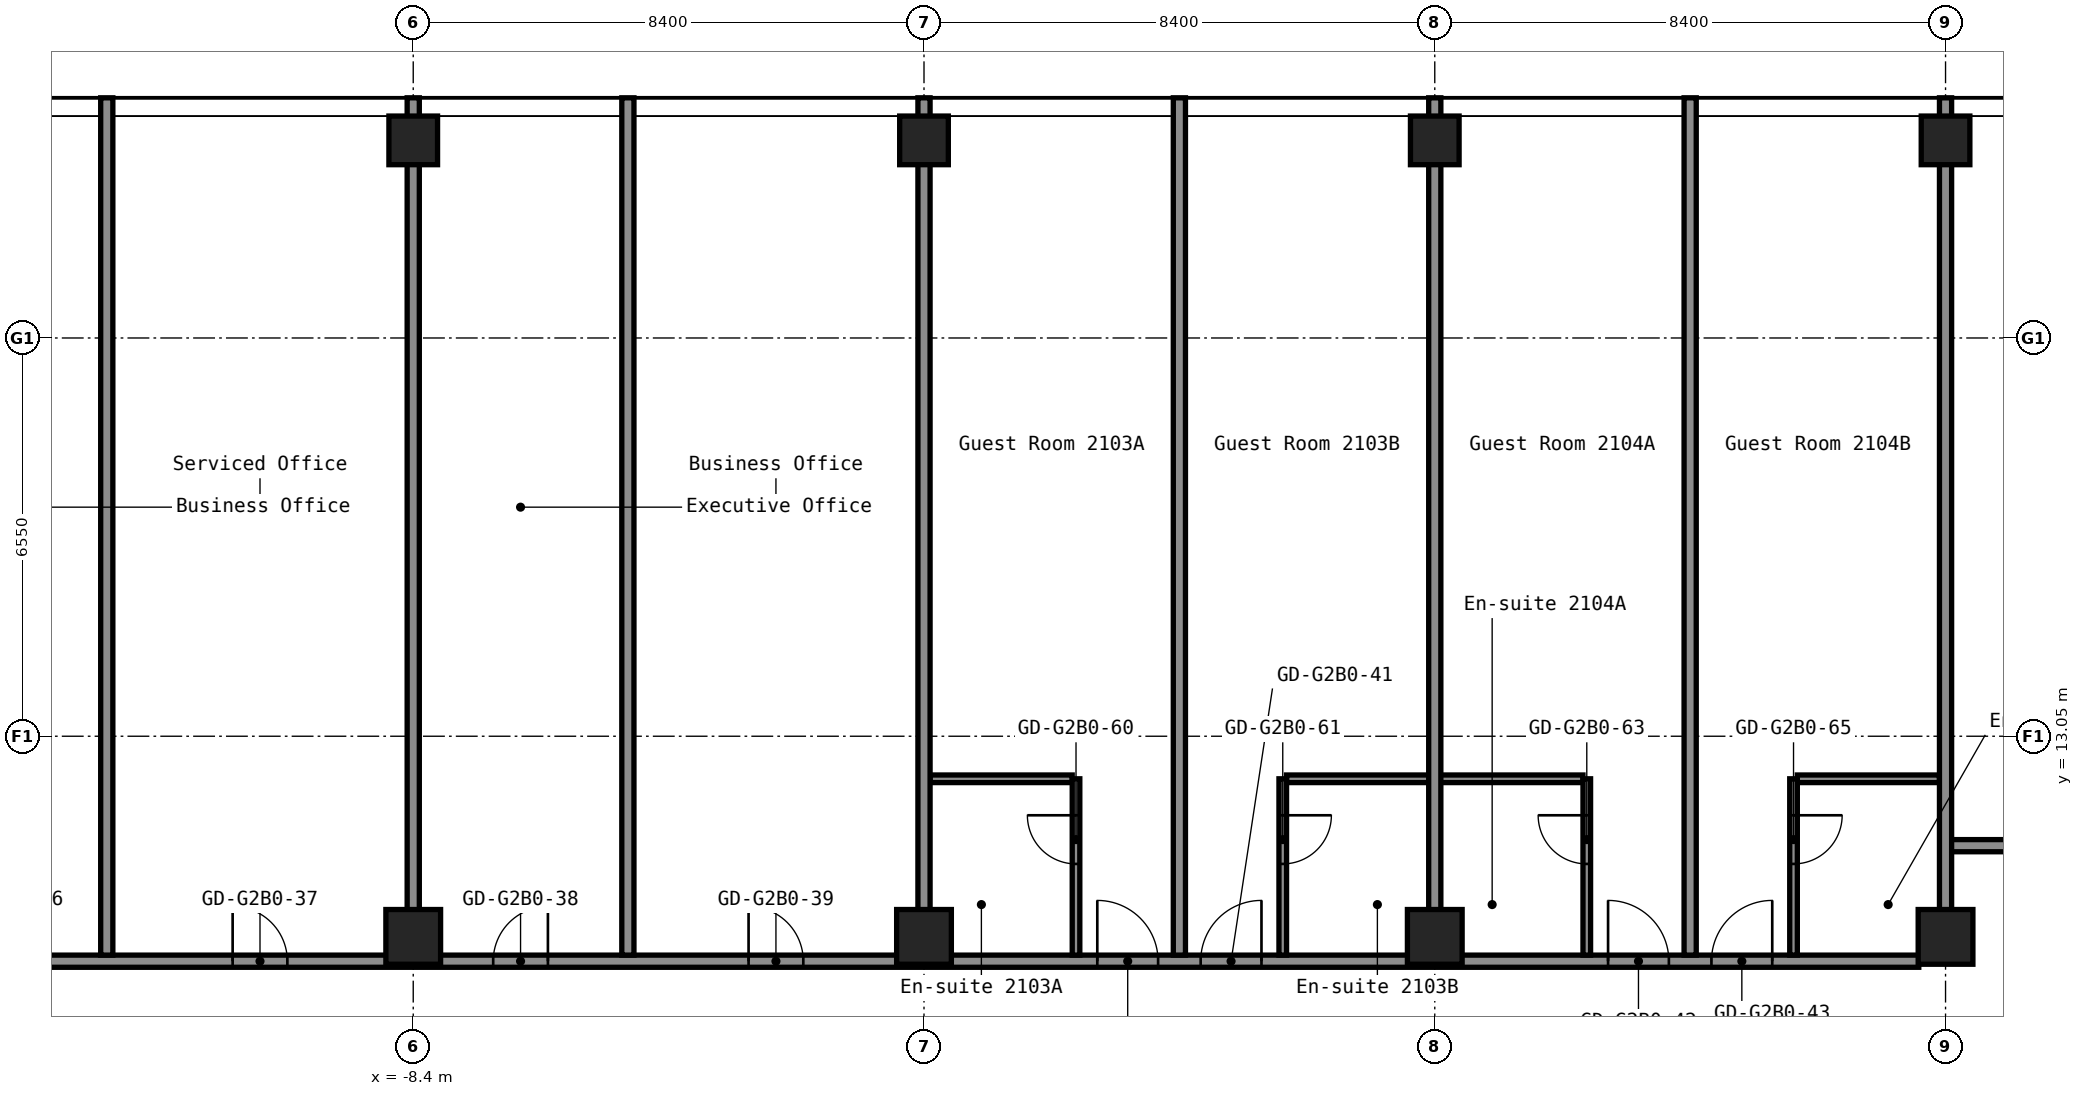
"""IFC4 building model, lengths in metres.
Left out: names, types, materials, properties, quantities, classifications, styles, units other than length and angle.
Written with IfcOpenShell. Run it as: python <this file> out.ifc"""

import sys

from ifc_helpers import new_model, si_unit, direction, frame, frame_2d, origin, origin_2d, place, context, subcontext, project, spatial, rectangle, hollow_rectangle, extrude, element, fill, save


model = new_model("IFC4")
c1 = context("Model", 3, precision=1e-05, world=origin(), true_north=direction((0.0, 1.0)))
c2 = subcontext(c1, "Body", "Model", "MODEL_VIEW")
j1 = project(units=[si_unit("LENGTHUNIT", "METRE"), si_unit("PLANEANGLEUNIT", "RADIAN")], contexts=[c1])
p1 = place(None, origin())
s1 = spatial("IfcSite", under=j1, at=p1, CompositionType="ELEMENT")
p2 = place(p1, origin())
s2 = spatial("IfcBuilding", under=s1, at=p2, CompositionType="ELEMENT")
p3 = place(p2, frame((0.0, 0.0, 78.6)))
s3 = spatial("IfcBuildingStorey", under=s2, at=p3, CompositionType="ELEMENT", Elevation=78.6)
p4 = place(p3, frame((-8.4, 9.75, 0.0), z_axis=(0.0, 0.0, 1.0), x_axis=(1.0, 0.0, 0.0)))
e1 = element("IfcColumn", 1, at=p4, inside=s3, PredefinedType="COLUMN", context=c2, shape_type="SweptSolid", body=[
    extrude(hollow_rectangle(XDim=0.9, YDim=0.9, WallThickness=0.036, at=origin_2d()), origin(), (0.0, 0.0, 1.0), 2.8),
])
p5 = place(p3, frame((-8.4, 22.85, 0.0), z_axis=(0.0, 0.0, 1.0), x_axis=(1.0, 0.0, 0.0)))
e2 = element("IfcColumn", 2, at=p5, inside=s3, PredefinedType="COLUMN", context=c2, shape_type="SweptSolid", body=[
    extrude(hollow_rectangle(XDim=0.8, YDim=0.8, WallThickness=0.032, at=origin_2d()), origin(), (0.0, 0.0, 1.0), 2.8),
])
p6 = place(p3, frame((0.0, 9.75, 0.0), z_axis=(0.0, 0.0, 1.0), x_axis=(1.0, 0.0, 0.0)))
e3 = element("IfcColumn", 3, at=p6, inside=s3, PredefinedType="COLUMN", context=c2, shape_type="SweptSolid", body=[
    extrude(hollow_rectangle(XDim=0.9, YDim=0.9, WallThickness=0.036, at=origin_2d()), origin(), (0.0, 0.0, 1.0), 2.8),
])
p7 = place(p3, frame((0.0, 22.85, 0.0), z_axis=(0.0, 0.0, 1.0), x_axis=(1.0, 0.0, 0.0)))
e4 = element("IfcColumn", 4, at=p7, inside=s3, PredefinedType="COLUMN", context=c2, shape_type="SweptSolid", body=[
    extrude(hollow_rectangle(XDim=0.8, YDim=0.8, WallThickness=0.032, at=origin_2d()), origin(), (0.0, 0.0, 1.0), 2.8),
])
p8 = place(p3, frame((8.4, 9.75, 0.0), z_axis=(0.0, 0.0, 1.0), x_axis=(1.0, 0.0, 0.0)))
e5 = element("IfcColumn", 5, at=p8, inside=s3, PredefinedType="COLUMN", context=c2, shape_type="SweptSolid", body=[
    extrude(hollow_rectangle(XDim=0.9, YDim=0.9, WallThickness=0.036, at=origin_2d()), origin(), (0.0, 0.0, 1.0), 2.8),
])
p9 = place(p3, frame((8.4, 22.85, 0.0), z_axis=(0.0, 0.0, 1.0), x_axis=(1.0, 0.0, 0.0)))
e6 = element("IfcColumn", 6, at=p9, inside=s3, PredefinedType="COLUMN", context=c2, shape_type="SweptSolid", body=[
    extrude(hollow_rectangle(XDim=0.8, YDim=0.8, WallThickness=0.032, at=origin_2d()), origin(), (0.0, 0.0, 1.0), 2.8),
])
p10 = place(p3, frame((16.8, 9.75, 0.0), z_axis=(0.0, 0.0, 1.0), x_axis=(1.0, 0.0, 0.0)))
e7 = element("IfcColumn", 7, at=p10, inside=s3, PredefinedType="COLUMN", context=c2, shape_type="SweptSolid", body=[
    extrude(hollow_rectangle(XDim=0.9, YDim=0.9, WallThickness=0.036, at=origin_2d()), origin(), (0.0, 0.0, 1.0), 2.8),
])
p11 = place(p3, frame((16.8, 22.85, 0.0), z_axis=(0.0, 0.0, 1.0), x_axis=(1.0, 0.0, 0.0)))
e8 = element("IfcColumn", 8, at=p11, inside=s3, PredefinedType="COLUMN", context=c2, shape_type="SweptSolid", body=[
    extrude(hollow_rectangle(XDim=0.8, YDim=0.8, WallThickness=0.032, at=origin_2d()), origin(), (0.0, 0.0, 1.0), 2.8),
])
p12 = place(p3, frame((-16.36, 9.35, 0.0), z_axis=(0.0, 0.0, 1.0), x_axis=(1.0, 0.0, 0.0)))
e9 = element("IfcWall", 9, at=p12, inside=s3, PredefinedType="PARTITIONING", context=c2, shape_type="SweptSolid", body=[
    extrude(rectangle(XDim=32.72, YDim=0.2, at=frame_2d((16.36, 0.0))), origin(), (0.0, 0.0, 1.0), 2.8),
])
p13 = place(p12, frame((0.79, 0.0, 0.0)))
e10 = element("IfcOpeningElement", 10, at=p13, cuts=e9, PredefinedType="OPENING", context=c2, shape_type="SweptSolid", body=[
    extrude(rectangle(XDim=0.9, YDim=2.1, at=frame_2d((0.45, 1.05))), frame((0.0, 0.11, 0.0), z_axis=(0.0, -1.0, 0.0), x_axis=(1.0, 0.0, 0.0)), (0.0, 0.0, 1.0), 0.22),
])
p14 = place(p12, frame((4.99, 0.0, 0.0)))
e11 = element("IfcOpeningElement", 11, at=p14, cuts=e9, PredefinedType="OPENING", context=c2, shape_type="SweptSolid", body=[
    extrude(rectangle(XDim=0.9, YDim=2.1, at=frame_2d((0.45, 1.05))), frame((0.0, 0.11, 0.0), z_axis=(0.0, -1.0, 0.0), x_axis=(1.0, 0.0, 0.0)), (0.0, 0.0, 1.0), 0.22),
])
p15 = place(p12, frame((9.275, 0.0, 0.0)))
e12 = element("IfcOpeningElement", 12, at=p15, cuts=e9, PredefinedType="OPENING", context=c2, shape_type="SweptSolid", body=[
    extrude(rectangle(XDim=0.9, YDim=2.1, at=frame_2d((0.45, 1.05))), frame((0.0, 0.11, 0.0), z_axis=(0.0, -1.0, 0.0), x_axis=(1.0, 0.0, 0.0)), (0.0, 0.0, 1.0), 0.22),
])
p16 = place(p12, frame((13.475, 0.0, 0.0)))
e13 = element("IfcOpeningElement", 13, at=p16, cuts=e9, PredefinedType="OPENING", context=c2, shape_type="SweptSolid", body=[
    extrude(rectangle(XDim=0.9, YDim=2.1, at=frame_2d((0.45, 1.05))), frame((0.0, 0.11, 0.0), z_axis=(0.0, -1.0, 0.0), x_axis=(1.0, 0.0, 0.0)), (0.0, 0.0, 1.0), 0.22),
])
p17 = place(p12, frame((19.21, 0.0, 0.0)))
e14 = element("IfcOpeningElement", 14, at=p17, cuts=e9, PredefinedType="OPENING", context=c2, shape_type="SweptSolid", body=[
    extrude(rectangle(XDim=1.0, YDim=2.1, at=frame_2d((0.5, 1.05))), frame((0.0, 0.11, 0.0), z_axis=(0.0, -1.0, 0.0), x_axis=(1.0, 0.0, 0.0)), (0.0, 0.0, 1.0), 0.22),
])
p18 = place(p12, frame((20.91, 0.0, 0.0)))
e15 = element("IfcOpeningElement", 15, at=p18, cuts=e9, PredefinedType="OPENING", context=c2, shape_type="SweptSolid", body=[
    extrude(rectangle(XDim=1.0, YDim=2.1, at=frame_2d((0.5, 1.05))), frame((0.0, 0.11, 0.0), z_axis=(0.0, -1.0, 0.0), x_axis=(1.0, 0.0, 0.0)), (0.0, 0.0, 1.0), 0.22),
])
p19 = place(p12, frame((27.61, 0.0, 0.0)))
e16 = element("IfcOpeningElement", 16, at=p19, cuts=e9, PredefinedType="OPENING", context=c2, shape_type="SweptSolid", body=[
    extrude(rectangle(XDim=1.0, YDim=2.1, at=frame_2d((0.5, 1.05))), frame((0.0, 0.11, 0.0), z_axis=(0.0, -1.0, 0.0), x_axis=(1.0, 0.0, 0.0)), (0.0, 0.0, 1.0), 0.22),
])
p20 = place(p12, frame((29.31, 0.0, 0.0)))
e17 = element("IfcOpeningElement", 17, at=p20, cuts=e9, PredefinedType="OPENING", context=c2, shape_type="SweptSolid", body=[
    extrude(rectangle(XDim=1.0, YDim=2.1, at=frame_2d((0.5, 1.05))), frame((0.0, 0.11, 0.0), z_axis=(0.0, -1.0, 0.0), x_axis=(1.0, 0.0, 0.0)), (0.0, 0.0, 1.0), 0.22),
])
p21 = place(p3, frame((16.8, 11.25, 0.0), z_axis=(0.0, 0.0, 1.0), x_axis=(1.0, 0.0, 0.0)))
e18 = element("IfcWall", 18, at=p21, inside=s3, PredefinedType="PARTITIONING", context=c2, shape_type="SweptSolid", body=[
    extrude(rectangle(XDim=29.7, YDim=0.2, at=frame_2d((14.85, 0.0))), origin(), (0.0, 0.0, 1.0), 2.8),
])
p22 = place(p21, frame((3.4, 0.0, 0.0)))
e19 = element("IfcOpeningElement", 19, at=p22, cuts=e18, PredefinedType="OPENING", context=c2, shape_type="SweptSolid", body=[
    extrude(rectangle(XDim=1.6, YDim=2.1, at=frame_2d((0.8, 1.05))), frame((0.0, 0.11, 0.0), z_axis=(0.0, -1.0, 0.0), x_axis=(1.0, 0.0, 0.0)), (0.0, 0.0, 1.0), 0.22),
])
p23 = place(p21, frame((11.8, 0.0, 0.0)))
e20 = element("IfcOpeningElement", 20, at=p23, cuts=e18, PredefinedType="OPENING", context=c2, shape_type="SweptSolid", body=[
    extrude(rectangle(XDim=1.6, YDim=2.1, at=frame_2d((0.8, 1.05))), frame((0.0, 0.11, 0.0), z_axis=(0.0, -1.0, 0.0), x_axis=(1.0, 0.0, 0.0)), (0.0, 0.0, 1.0), 0.22),
])
p24 = place(p21, frame((20.2, 0.0, 0.0)))
e21 = element("IfcOpeningElement", 21, at=p24, cuts=e18, PredefinedType="OPENING", context=c2, shape_type="SweptSolid", body=[
    extrude(rectangle(XDim=1.6, YDim=2.1, at=frame_2d((0.8, 1.05))), frame((0.0, 0.11, 0.0), z_axis=(0.0, -1.0, 0.0), x_axis=(1.0, 0.0, 0.0)), (0.0, 0.0, 1.0), 0.22),
])
p25 = place(p21, frame((26.85, 0.0, 0.0)))
e22 = element("IfcOpeningElement", 22, at=p25, cuts=e18, PredefinedType="OPENING", context=c2, shape_type="SweptSolid", body=[
    extrude(rectangle(XDim=0.9, YDim=2.1, at=frame_2d((0.45, 1.05))), frame((0.0, 0.11, 0.0), z_axis=(0.0, -1.0, 0.0), x_axis=(1.0, 0.0, 0.0)), (0.0, 0.0, 1.0), 0.22),
])
p26 = place(p3, frame((0.1, 12.35, 0.0), z_axis=(0.0, 0.0, 1.0), x_axis=(1.0, 0.0, 0.0)))
e23 = element("IfcWall", 23, at=p26, inside=s3, PredefinedType="PARTITIONING", context=c2, shape_type="SweptSolid", body=[
    extrude(rectangle(XDim=2.337, YDim=0.125, at=frame_2d((1.169, 0.0))), origin(), (0.0, 0.0, 1.0), 2.8),
])
p27 = place(p3, frame((5.962, 12.35, 0.0), z_axis=(0.0, 0.0, 1.0), x_axis=(1.0, 0.0, 0.0)))
e24 = element("IfcWall", 24, at=p27, inside=s3, PredefinedType="PARTITIONING", context=c2, shape_type="SweptSolid", body=[
    extrude(rectangle(XDim=4.875, YDim=0.125, at=frame_2d((2.438, 0.0))), origin(), (0.0, 0.0, 1.0), 2.8),
])
p28 = place(p3, frame((14.363, 12.35, 0.0), z_axis=(0.0, 0.0, 1.0), x_axis=(1.0, 0.0, 0.0)))
e25 = element("IfcWall", 25, at=p28, inside=s3, PredefinedType="PARTITIONING", context=c2, shape_type="SweptSolid", body=[
    extrude(rectangle(XDim=2.337, YDim=0.125, at=frame_2d((1.169, 0.0))), origin(), (0.0, 0.0, 1.0), 2.8),
])
p29 = place(p3, frame((-13.44, 9.45, 0.0), z_axis=(0.0, 0.0, 1.0), x_axis=(0.0, 1.0, 0.0)))
e26 = element("IfcWall", 26, at=p29, inside=s3, PredefinedType="PARTITIONING", context=c2, shape_type="SweptSolid", body=[
    extrude(rectangle(XDim=14.1, YDim=0.2, at=frame_2d((7.05, 0.0))), origin(), (0.0, 0.0, 1.0), 2.8),
])
p30 = place(p3, frame((-8.4, 10.19, 0.0), z_axis=(0.0, 0.0, 1.0), x_axis=(0.0, 1.0, 0.0)))
e27 = element("IfcWall", 27, at=p30, inside=s3, PredefinedType="PARTITIONING", context=c2, shape_type="SweptSolid", body=[
    extrude(rectangle(XDim=13.36, YDim=0.2, at=frame_2d((6.68, 0.0))), origin(), (0.0, 0.0, 1.0), 2.8),
])
p31 = place(p3, frame((-4.87, 9.45, 0.0), z_axis=(0.0, 0.0, 1.0), x_axis=(0.0, 1.0, 0.0)))
e28 = element("IfcWall", 28, at=p31, inside=s3, PredefinedType="PARTITIONING", context=c2, shape_type="SweptSolid", body=[
    extrude(rectangle(XDim=14.1, YDim=0.2, at=frame_2d((7.05, 0.0))), origin(), (0.0, 0.0, 1.0), 2.8),
])
p32 = place(p3, frame((0.0, 10.19, 0.0), z_axis=(0.0, 0.0, 1.0), x_axis=(0.0, 1.0, 0.0)))
e29 = element("IfcWall", 29, at=p32, inside=s3, PredefinedType="PARTITIONING", context=c2, shape_type="SweptSolid", body=[
    extrude(rectangle(XDim=13.36, YDim=0.2, at=frame_2d((6.68, 0.0))), origin(), (0.0, 0.0, 1.0), 2.8),
])
p33 = place(p3, frame((2.5, 9.45, 0.0), z_axis=(0.0, 0.0, 1.0), x_axis=(0.0, 1.0, 0.0)))
e30 = element("IfcWall", 30, at=p33, inside=s3, PredefinedType="PARTITIONING", context=c2, shape_type="SweptSolid", body=[
    extrude(rectangle(XDim=2.9, YDim=0.125, at=frame_2d((1.45, 0.0))), origin(), (0.0, 0.0, 1.0), 2.8),
])
p34 = place(p33, frame((1.5, 0.0, 0.0)))
e31 = element("IfcOpeningElement", 31, at=p34, cuts=e30, PredefinedType="OPENING", context=c2, shape_type="SweptSolid", body=[
    extrude(rectangle(XDim=0.8, YDim=2.1, at=frame_2d((0.4, 1.05))), frame((0.0, 0.073, 0.0), z_axis=(0.0, -1.0, 0.0), x_axis=(1.0, 0.0, 0.0)), (0.0, 0.0, 1.0), 0.145),
])
p35 = place(p3, frame((4.2, 9.45, 0.0), z_axis=(0.0, 0.0, 1.0), x_axis=(0.0, 1.0, 0.0)))
e32 = element("IfcWall", 32, at=p35, inside=s3, PredefinedType="PARTITIONING", context=c2, shape_type="SweptSolid", body=[
    extrude(rectangle(XDim=14.1, YDim=0.2, at=frame_2d((7.05, 0.0))), origin(), (0.0, 0.0, 1.0), 2.8),
])
p36 = place(p3, frame((5.9, 9.45, 0.0), z_axis=(0.0, 0.0, 1.0), x_axis=(0.0, 1.0, 0.0)))
e33 = element("IfcWall", 33, at=p36, inside=s3, PredefinedType="PARTITIONING", context=c2, shape_type="SweptSolid", body=[
    extrude(rectangle(XDim=2.9, YDim=0.125, at=frame_2d((1.45, 0.0))), origin(), (0.0, 0.0, 1.0), 2.8),
])
p37 = place(p36, frame((1.5, 0.0, 0.0)))
e34 = element("IfcOpeningElement", 34, at=p37, cuts=e33, PredefinedType="OPENING", context=c2, shape_type="SweptSolid", body=[
    extrude(rectangle(XDim=0.8, YDim=2.1, at=frame_2d((0.4, 1.05))), frame((0.0, 0.073, 0.0), z_axis=(0.0, -1.0, 0.0), x_axis=(1.0, 0.0, 0.0)), (0.0, 0.0, 1.0), 0.145),
])
p38 = place(p3, frame((8.4, 10.19, 0.0), z_axis=(0.0, 0.0, 1.0), x_axis=(0.0, 1.0, 0.0)))
e35 = element("IfcWall", 35, at=p38, inside=s3, PredefinedType="PARTITIONING", context=c2, shape_type="SweptSolid", body=[
    extrude(rectangle(XDim=13.36, YDim=0.2, at=frame_2d((6.68, 0.0))), origin(), (0.0, 0.0, 1.0), 2.8),
])
p39 = place(p3, frame((10.9, 9.45, 0.0), z_axis=(0.0, 0.0, 1.0), x_axis=(0.0, 1.0, 0.0)))
e36 = element("IfcWall", 36, at=p39, inside=s3, PredefinedType="PARTITIONING", context=c2, shape_type="SweptSolid", body=[
    extrude(rectangle(XDim=2.9, YDim=0.125, at=frame_2d((1.45, 0.0))), origin(), (0.0, 0.0, 1.0), 2.8),
])
p40 = place(p39, frame((1.5, 0.0, 0.0)))
e37 = element("IfcOpeningElement", 37, at=p40, cuts=e36, PredefinedType="OPENING", context=c2, shape_type="SweptSolid", body=[
    extrude(rectangle(XDim=0.8, YDim=2.1, at=frame_2d((0.4, 1.05))), frame((0.0, 0.073, 0.0), z_axis=(0.0, -1.0, 0.0), x_axis=(1.0, 0.0, 0.0)), (0.0, 0.0, 1.0), 0.145),
])
p41 = place(p3, frame((12.6, 9.45, 0.0), z_axis=(0.0, 0.0, 1.0), x_axis=(0.0, 1.0, 0.0)))
e38 = element("IfcWall", 38, at=p41, inside=s3, PredefinedType="PARTITIONING", context=c2, shape_type="SweptSolid", body=[
    extrude(rectangle(XDim=14.1, YDim=0.2, at=frame_2d((7.05, 0.0))), origin(), (0.0, 0.0, 1.0), 2.8),
])
p42 = place(p3, frame((14.3, 9.45, 0.0), z_axis=(0.0, 0.0, 1.0), x_axis=(0.0, 1.0, 0.0)))
e39 = element("IfcWall", 39, at=p42, inside=s3, PredefinedType="PARTITIONING", context=c2, shape_type="SweptSolid", body=[
    extrude(rectangle(XDim=2.9, YDim=0.125, at=frame_2d((1.45, 0.0))), origin(), (0.0, 0.0, 1.0), 2.8),
])
p43 = place(p42, frame((1.5, 0.0, 0.0)))
e40 = element("IfcOpeningElement", 40, at=p43, cuts=e39, PredefinedType="OPENING", context=c2, shape_type="SweptSolid", body=[
    extrude(rectangle(XDim=0.8, YDim=2.1, at=frame_2d((0.4, 1.05))), frame((0.0, 0.073, 0.0), z_axis=(0.0, -1.0, 0.0), x_axis=(1.0, 0.0, 0.0)), (0.0, 0.0, 1.0), 0.145),
])
p44 = place(p3, frame((16.8, 10.19, 0.0), z_axis=(0.0, 0.0, 1.0), x_axis=(0.0, 1.0, 0.0)))
e41 = element("IfcWall", 41, at=p44, inside=s3, PredefinedType="PARTITIONING", context=c2, shape_type="SweptSolid", body=[
    extrude(rectangle(XDim=13.36, YDim=0.2, at=frame_2d((6.68, 0.0))), origin(), (0.0, 0.0, 1.0), 2.8),
])
p45 = place(p14, origin())
e42 = element("IfcDoor", 42, at=p45, inside=s3, OperationType="SINGLE_SWING_RIGHT", PredefinedType="DOOR", context=c2, shape_type="SweptSolid", body=[
    extrude(rectangle(XDim=0.9, YDim=2.1, at=frame_2d((0.45, 1.05))), frame((0.0, 0.025, 0.0), z_axis=(0.0, -1.0, 0.0), x_axis=(1.0, 0.0, 0.0)), (0.0, 0.0, 1.0), 0.05),
])
fill(e11, e42)
p46 = place(p15, origin())
e43 = element("IfcDoor", 43, at=p46, inside=s3, OperationType="SINGLE_SWING_LEFT", PredefinedType="DOOR", context=c2, shape_type="SweptSolid", body=[
    extrude(rectangle(XDim=0.9, YDim=2.1, at=frame_2d((0.45, 1.05))), frame((0.0, 0.025, 0.0), z_axis=(0.0, -1.0, 0.0), x_axis=(1.0, 0.0, 0.0)), (0.0, 0.0, 1.0), 0.05),
])
fill(e12, e43)
p47 = place(p16, origin())
e44 = element("IfcDoor", 44, at=p47, inside=s3, OperationType="SINGLE_SWING_RIGHT", PredefinedType="DOOR", context=c2, shape_type="SweptSolid", body=[
    extrude(rectangle(XDim=0.9, YDim=2.1, at=frame_2d((0.45, 1.05))), frame((0.0, 0.025, 0.0), z_axis=(0.0, -1.0, 0.0), x_axis=(1.0, 0.0, 0.0)), (0.0, 0.0, 1.0), 0.05),
])
fill(e13, e44)
p48 = place(p17, origin())
e45 = element("IfcDoor", 45, at=p48, inside=s3, OperationType="SINGLE_SWING_RIGHT", PredefinedType="DOOR", context=c2, shape_type="SweptSolid", body=[
    extrude(rectangle(XDim=1.0, YDim=2.1, at=frame_2d((0.5, 1.05))), frame((0.0, 0.025, 0.0), z_axis=(0.0, -1.0, 0.0), x_axis=(1.0, 0.0, 0.0)), (0.0, 0.0, 1.0), 0.05),
])
fill(e14, e45)
p49 = place(p18, origin())
e46 = element("IfcDoor", 46, at=p49, inside=s3, OperationType="SINGLE_SWING_LEFT", PredefinedType="DOOR", context=c2, shape_type="SweptSolid", body=[
    extrude(rectangle(XDim=1.0, YDim=2.1, at=frame_2d((0.5, 1.05))), frame((0.0, 0.025, 0.0), z_axis=(0.0, -1.0, 0.0), x_axis=(1.0, 0.0, 0.0)), (0.0, 0.0, 1.0), 0.05),
])
fill(e15, e46)
p50 = place(p19, origin())
e47 = element("IfcDoor", 47, at=p50, inside=s3, OperationType="SINGLE_SWING_RIGHT", PredefinedType="DOOR", context=c2, shape_type="SweptSolid", body=[
    extrude(rectangle(XDim=1.0, YDim=2.1, at=frame_2d((0.5, 1.05))), frame((0.0, 0.025, 0.0), z_axis=(0.0, -1.0, 0.0), x_axis=(1.0, 0.0, 0.0)), (0.0, 0.0, 1.0), 0.05),
])
fill(e16, e47)
p51 = place(p20, origin())
e48 = element("IfcDoor", 48, at=p51, inside=s3, OperationType="SINGLE_SWING_LEFT", PredefinedType="DOOR", context=c2, shape_type="SweptSolid", body=[
    extrude(rectangle(XDim=1.0, YDim=2.1, at=frame_2d((0.5, 1.05))), frame((0.0, 0.025, 0.0), z_axis=(0.0, -1.0, 0.0), x_axis=(1.0, 0.0, 0.0)), (0.0, 0.0, 1.0), 0.05),
])
fill(e17, e48)
p52 = place(p34, origin())
e49 = element("IfcDoor", 49, at=p52, inside=s3, OperationType="SINGLE_SWING_LEFT", PredefinedType="DOOR", context=c2, shape_type="SweptSolid", body=[
    extrude(rectangle(XDim=0.8, YDim=2.1, at=frame_2d((0.4, 1.05))), frame((0.0, 0.025, 0.0), z_axis=(0.0, -1.0, 0.0), x_axis=(1.0, 0.0, 0.0)), (0.0, 0.0, 1.0), 0.05),
])
fill(e31, e49)
p53 = place(p37, origin())
e50 = element("IfcDoor", 50, at=p53, inside=s3, OperationType="SINGLE_SWING_RIGHT", PredefinedType="DOOR", context=c2, shape_type="SweptSolid", body=[
    extrude(rectangle(XDim=0.8, YDim=2.1, at=frame_2d((0.4, 1.05))), frame((0.0, 0.025, 0.0), z_axis=(0.0, -1.0, 0.0), x_axis=(1.0, 0.0, 0.0)), (0.0, 0.0, 1.0), 0.05),
])
fill(e34, e50)
p54 = place(p40, origin())
e51 = element("IfcDoor", 51, at=p54, inside=s3, OperationType="SINGLE_SWING_LEFT", PredefinedType="DOOR", context=c2, shape_type="SweptSolid", body=[
    extrude(rectangle(XDim=0.8, YDim=2.1, at=frame_2d((0.4, 1.05))), frame((0.0, 0.025, 0.0), z_axis=(0.0, -1.0, 0.0), x_axis=(1.0, 0.0, 0.0)), (0.0, 0.0, 1.0), 0.05),
])
fill(e37, e51)
p55 = place(p43, origin())
e52 = element("IfcDoor", 52, at=p55, inside=s3, OperationType="SINGLE_SWING_RIGHT", PredefinedType="DOOR", context=c2, shape_type="SweptSolid", body=[
    extrude(rectangle(XDim=0.8, YDim=2.1, at=frame_2d((0.4, 1.05))), frame((0.0, 0.025, 0.0), z_axis=(0.0, -1.0, 0.0), x_axis=(1.0, 0.0, 0.0)), (0.0, 0.0, 1.0), 0.05),
])
fill(e40, e52)
save(model, sys.argv[1])
